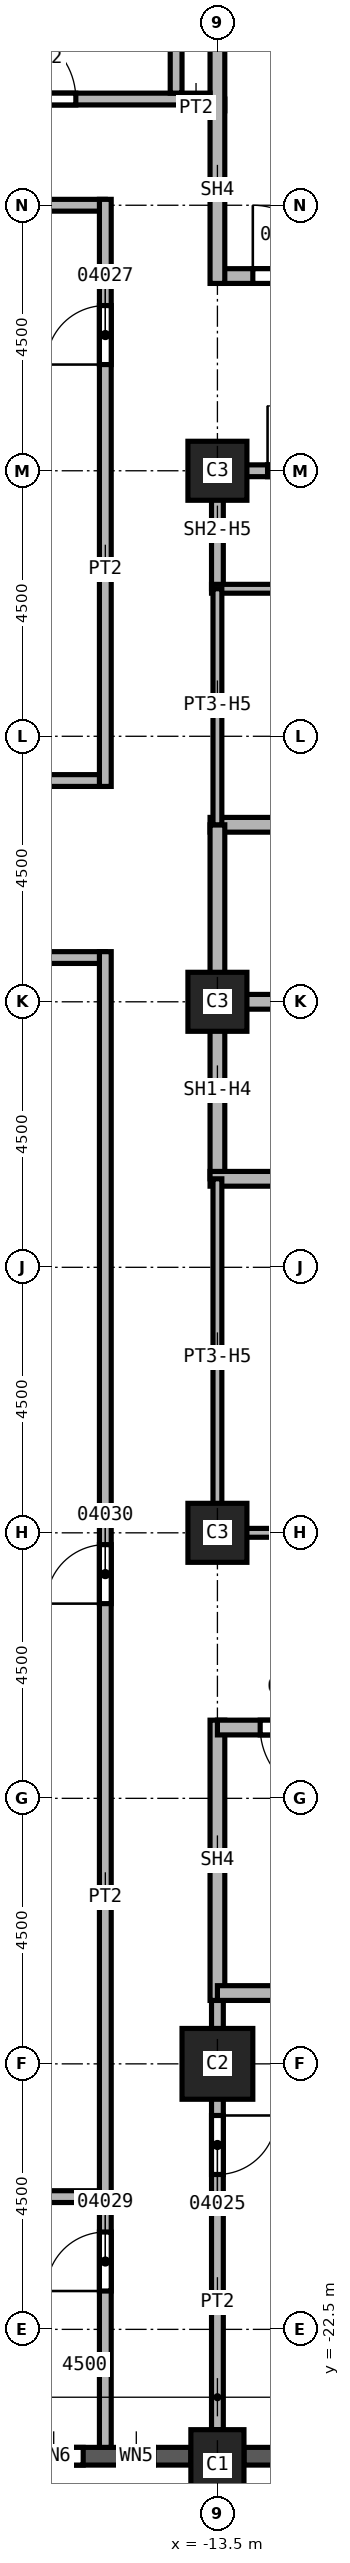
"""IFC4 building model, lengths in metres.
Left out: names, types, materials, properties, quantities, classifications, styles, units other than length and angle.
Written with IfcOpenShell. Run it as: python <this file> out.ifc"""

import sys

from ifc_helpers import new_model, si_unit, direction, frame, frame_2d, origin, origin_2d, place, context, subcontext, project, spatial, rectangle, extrude, element, fill, save


model = new_model("IFC4")
c1 = context("Model", 3, precision=1e-05, world=origin(), true_north=direction((0.0, 1.0)))
c2 = subcontext(c1, "Body", "Model", "MODEL_VIEW")
j1 = project(units=[si_unit("LENGTHUNIT", "METRE"), si_unit("PLANEANGLEUNIT", "RADIAN")], contexts=[c1])
p1 = place(None, origin())
s1 = spatial("IfcSite", under=j1, at=p1, CompositionType="ELEMENT")
p2 = place(p1, origin())
s2 = spatial("IfcBuilding", under=s1, at=p2, CompositionType="ELEMENT")
p3 = place(p2, frame((0.0, 0.0, 108.0)))
s3 = spatial("IfcBuildingStorey", under=s2, at=p3, CompositionType="ELEMENT", Elevation=108.0)
p4 = place(p3, frame((-13.5, -18.0, 0.0), z_axis=(0.0, 0.0, 1.0), x_axis=(1.0, 0.0, 0.0)))
e1 = element("IfcColumn", 1, at=p4, inside=s3, PredefinedType="COLUMN", context=c2, shape_type="SweptSolid", body=[
    extrude(rectangle(XDim=1.2, YDim=1.2, at=origin_2d()), origin(), (0.0, 0.0, 1.0), 3.7),
])
for number, where, z_axis, x_axis in (
    (2, (-13.5, 0.0, 0.0), (0.0, 0.0, 1.0), (1.0, 0.0, 0.0)),
    (3, (-13.5, 9.0, 0.0), (0.0, 0.0, 1.0), (1.0, 0.0, 0.0)),
    (4, (-13.5, -9.0, 0.0), (0.0, 0.0, 1.0), (1.0, 0.0, 0.0)),
):
    element("IfcColumn", number, at=place(p3, frame(where, z_axis=z_axis, x_axis=x_axis)), inside=s3, PredefinedType="COLUMN", context=c2, shape_type="SweptSolid", body=[
        extrude(rectangle(XDim=1.0, YDim=1.0, at=origin_2d()), origin(), (0.0, 0.0, 1.0), 3.7),
    ])
p5 = place(p3, frame((-13.5, -24.8, 0.0), z_axis=(0.0, 0.0, 1.0), x_axis=(1.0, 0.0, 0.0)))
e5 = element("IfcColumn", 5, at=p5, inside=s3, PredefinedType="COLUMN", context=c2, shape_type="SweptSolid", body=[
    extrude(rectangle(XDim=0.9, YDim=1.2, at=origin_2d()), origin(), (0.0, 0.0, 1.0), 3.7),
])
p6 = place(p3, frame((-17.55, -24.65, 0.0), z_axis=(0.0, 0.0, 1.0), x_axis=(1.0, 0.0, 0.0)))
e6 = element("IfcWall", 6, at=p6, inside=s3, PredefinedType="SOLIDWALL", context=c2, shape_type="SweptSolid", body=[
    extrude(rectangle(XDim=3.6, YDim=0.3, at=frame_2d((1.8, 0.0))), origin(), (0.0, 0.0, 1.0), 3.1),
])
p7 = place(p6, frame((0.775, 0.0, 0.8)))
e7 = element("IfcOpeningElement", 7, at=p7, cuts=e6, PredefinedType="OPENING", context=c2, shape_type="SweptSolid", body=[
    extrude(rectangle(XDim=1.0, YDim=1.95, at=frame_2d((0.5, 0.975))), frame((0.0, 0.15, 0.0), z_axis=(0.0, -1.0, 0.0), x_axis=(1.0, 0.0, 0.0)), (0.0, 0.0, 1.0), 0.3),
])
p8 = place(p6, frame((2.375, 0.0, 0.8)))
e8 = element("IfcOpeningElement", 8, at=p8, cuts=e6, PredefinedType="OPENING", context=c2, shape_type="SweptSolid", body=[
    extrude(rectangle(XDim=0.6, YDim=1.95, at=frame_2d((0.3, 0.975))), frame((0.0, 0.15, 0.0), z_axis=(0.0, -1.0, 0.0), x_axis=(1.0, 0.0, 0.0)), (0.0, 0.0, 1.0), 0.3),
])
p9 = place(p3, frame((-13.05, -24.65, 0.0), z_axis=(0.0, 0.0, 1.0), x_axis=(1.0, 0.0, 0.0)))
e9 = element("IfcWall", 9, at=p9, inside=s3, PredefinedType="SOLIDWALL", context=c2, shape_type="SweptSolid", body=[
    extrude(rectangle(XDim=3.6, YDim=0.3, at=frame_2d((1.8, 0.0))), origin(), (0.0, 0.0, 1.0), 3.1),
])
p10 = place(p9, frame((0.6, 0.0, 0.8)))
e10 = element("IfcOpeningElement", 10, at=p10, cuts=e9, PredefinedType="OPENING", context=c2, shape_type="SweptSolid", body=[
    extrude(rectangle(XDim=2.4, YDim=1.95, at=frame_2d((1.2, 0.975))), frame((0.0, 0.15, 0.0), z_axis=(0.0, -1.0, 0.0), x_axis=(1.0, 0.0, 0.0)), (0.0, 0.0, 1.0), 0.3),
])
p11 = place(p3, frame((-33.85, 3.75, 0.0), z_axis=(0.0, 0.0, 1.0), x_axis=(1.0, 0.0, 0.0)))
e11 = element("IfcWall", 11, at=p11, inside=s3, PredefinedType="PARTITIONING", context=c2, shape_type="SweptSolid", body=[
    extrude(rectangle(XDim=18.45, YDim=0.2, at=frame_2d((9.225, 0.0))), origin(), (0.0, 0.0, 1.0), 3.7),
])
p12 = place(p3, frame((-15.4, 0.75, 0.0), z_axis=(0.0, 0.0, 1.0), x_axis=(-1.0, 0.0, 0.0)))
e12 = element("IfcWall", 12, at=p12, inside=s3, PredefinedType="PARTITIONING", context=c2, shape_type="SweptSolid", body=[
    extrude(rectangle(XDim=18.45, YDim=0.2, at=frame_2d((9.225, 0.0))), origin(), (0.0, 0.0, 1.0), 3.7),
])
p13 = place(p12, frame((12.65, 0.0, 0.0)))
e13 = element("IfcOpeningElement", 13, at=p13, cuts=e12, PredefinedType="OPENING", context=c2, shape_type="SweptSolid", body=[
    extrude(rectangle(XDim=1.0, YDim=2.1, at=frame_2d((0.5, 1.05))), frame((0.0, 0.1, 0.0), z_axis=(0.0, -1.0, 0.0), x_axis=(1.0, 0.0, 0.0)), (0.0, 0.0, 1.0), 0.2),
])
p14 = place(p3, frame((-24.3, -20.25, 0.0), z_axis=(0.0, 0.0, 1.0), x_axis=(1.0, 0.0, 0.0)))
e14 = element("IfcWall", 14, at=p14, inside=s3, PredefinedType="PARTITIONING", context=c2, shape_type="SweptSolid", body=[
    extrude(rectangle(XDim=8.9, YDim=0.2, at=frame_2d((4.45, 0.0))), origin(), (0.0, 0.0, 1.0), 3.7),
])
p15 = place(p3, frame((-15.4, 13.5, 0.0), z_axis=(0.0, 0.0, 1.0), x_axis=(-1.0, 0.0, 0.0)))
e15 = element("IfcWall", 15, at=p15, inside=s3, PredefinedType="PARTITIONING", context=c2, shape_type="SweptSolid", body=[
    extrude(rectangle(XDim=6.6, YDim=0.2, at=frame_2d((3.3, 0.0))), origin(), (0.0, 0.0, 1.0), 3.7),
])
p16 = place(p3, frame((-15.4, -24.5, 0.0), z_axis=(0.0, 0.0, 1.0), x_axis=(0.0, 1.0, 0.0)))
e16 = element("IfcWall", 16, at=p16, inside=s3, PredefinedType="PARTITIONING", context=c2, shape_type="SweptSolid", body=[
    extrude(rectangle(XDim=25.35, YDim=0.2, at=frame_2d((12.675, 0.0))), origin(), (0.0, 0.0, 1.0), 3.7),
])
p17 = place(p16, frame((2.65, 0.0, 0.0)))
e17 = element("IfcOpeningElement", 17, at=p17, cuts=e16, PredefinedType="OPENING", context=c2, shape_type="SweptSolid", body=[
    extrude(rectangle(XDim=1.0, YDim=2.1, at=frame_2d((0.5, 1.05))), frame((0.0, 0.1, 0.0), z_axis=(0.0, -1.0, 0.0), x_axis=(1.0, 0.0, 0.0)), (0.0, 0.0, 1.0), 0.2),
])
p18 = place(p16, frame((14.3, 0.0, 0.0)))
e18 = element("IfcOpeningElement", 18, at=p18, cuts=e16, PredefinedType="OPENING", context=c2, shape_type="SweptSolid", body=[
    extrude(rectangle(XDim=1.0, YDim=2.1, at=frame_2d((0.5, 1.05))), frame((0.0, 0.1, 0.0), z_axis=(0.0, -1.0, 0.0), x_axis=(1.0, 0.0, 0.0)), (0.0, 0.0, 1.0), 0.2),
])
p19 = place(p3, frame((-15.4, 3.65, 0.0), z_axis=(0.0, 0.0, 1.0), x_axis=(0.0, 1.0, 0.0)))
e19 = element("IfcWall", 19, at=p19, inside=s3, PredefinedType="PARTITIONING", context=c2, shape_type="SweptSolid", body=[
    extrude(rectangle(XDim=9.95, YDim=0.2, at=frame_2d((4.975, 0.0))), origin(), (0.0, 0.0, 1.0), 3.7),
])
p20 = place(p19, frame((7.15, 0.0, 0.0)))
e20 = element("IfcOpeningElement", 20, at=p20, cuts=e19, PredefinedType="OPENING", context=c2, shape_type="SweptSolid", body=[
    extrude(rectangle(XDim=1.0, YDim=2.1, at=frame_2d((0.5, 1.05))), frame((0.0, 0.1, 0.0), z_axis=(0.0, -1.0, 0.0), x_axis=(1.0, 0.0, 0.0)), (0.0, 0.0, 1.0), 0.2),
])
p21 = place(p3, frame((-14.1, 15.2, 0.0), z_axis=(0.0, 0.0, 1.0), x_axis=(1.0, 0.0, 0.0)))
e21 = element("IfcWall", 21, at=p21, inside=s3, PredefinedType="PARTITIONING", context=c2, shape_type="SweptSolid", body=[
    extrude(rectangle(XDim=0.725, YDim=0.2, at=frame_2d((0.363, 0.0))), origin(), (0.0, 0.0, 1.0), 3.7),
])
p22 = place(p3, frame((-13.5, -16.675, 0.0), z_axis=(0.0, 0.0, 1.0), x_axis=(0.0, -1.0, 0.0)))
e22 = element("IfcWall", 22, at=p22, inside=s3, PredefinedType="PARTITIONING", context=c2, shape_type="SweptSolid", body=[
    extrude(rectangle(XDim=7.525, YDim=0.2, at=frame_2d((3.762, 0.0))), origin(), (0.0, 0.0, 1.0), 3.7),
])
p23 = place(p22, frame((2.2, 0.0, 0.0)))
e23 = element("IfcOpeningElement", 23, at=p23, cuts=e22, PredefinedType="OPENING", context=c2, shape_type="SweptSolid", body=[
    extrude(rectangle(XDim=1.0, YDim=2.1, at=frame_2d((0.5, 1.05))), frame((0.0, 0.1, 0.0), z_axis=(0.0, -1.0, 0.0), x_axis=(1.0, 0.0, 0.0)), (0.0, 0.0, 1.0), 0.2),
])
p24 = place(p3, frame((-13.5, 7.0, 0.0), z_axis=(0.0, 0.0, 1.0), x_axis=(0.0, 1.0, 0.0)))
e24 = element("IfcWall", 24, at=p24, inside=s3, PredefinedType="SOLIDWALL", context=c2, shape_type="SweptSolid", body=[
    extrude(rectangle(XDim=2.1, YDim=0.2, at=frame_2d((1.05, 0.0))), origin(), (0.0, 0.0, 1.0), 2.938),
])
p25 = place(p3, frame((-13.5, 9.0, 0.0), z_axis=(0.0, 0.0, 1.0), x_axis=(1.0, 0.0, 0.0)))
e25 = element("IfcWall", 25, at=p25, inside=s3, PredefinedType="SOLIDWALL", context=c2, shape_type="SweptSolid", body=[
    extrude(rectangle(XDim=3.0, YDim=0.2, at=frame_2d((1.5, 0.0))), origin(), (0.0, 0.0, 1.0), 2.938),
])
p26 = place(p25, frame((0.85, 0.0, 0.0)))
e26 = element("IfcOpeningElement", 26, at=p26, cuts=e25, PredefinedType="OPENING", context=c2, shape_type="SweptSolid", body=[
    extrude(rectangle(XDim=1.1, YDim=2.1, at=frame_2d((0.55, 1.05))), frame((0.0, 0.1, 0.0), z_axis=(0.0, -1.0, 0.0), x_axis=(1.0, 0.0, 0.0)), (0.0, 0.0, 1.0), 0.2),
])
p27 = place(p3, frame((-13.625, 0.0, 0.0), z_axis=(0.0, 0.0, 1.0), x_axis=(1.0, 0.0, 0.0)))
e27 = element("IfcWall", 27, at=p27, inside=s3, PredefinedType="SOLIDWALL", context=c2, shape_type="SweptSolid", body=[
    extrude(rectangle(XDim=3.125, YDim=0.25, at=frame_2d((1.562, 0.0))), origin(), (0.0, 0.0, 1.0), 3.7),
])
p28 = place(p3, frame((-13.625, 3.0, 0.0), z_axis=(0.0, 0.0, 1.0), x_axis=(1.0, 0.0, 0.0)))
e28 = element("IfcWall", 28, at=p28, inside=s3, PredefinedType="SOLIDWALL", context=c2, shape_type="SweptSolid", body=[
    extrude(rectangle(XDim=6.125, YDim=0.25, at=frame_2d((3.062, 0.0))), origin(), (0.0, 0.0, 1.0), 3.7),
])
p29 = place(p28, frame((3.25, 0.0, 0.0)))
e29 = element("IfcOpeningElement", 29, at=p29, cuts=e28, PredefinedType="OPENING", context=c2, shape_type="SweptSolid", body=[
    extrude(rectangle(XDim=1.1, YDim=2.1, at=frame_2d((0.55, 1.05))), frame((0.0, 0.125, 0.0), z_axis=(0.0, -1.0, 0.0), x_axis=(1.0, 0.0, 0.0)), (0.0, 0.0, 1.0), 0.25),
])
p30 = place(p3, frame((-13.5, -3.0, 0.0), z_axis=(0.0, 0.0, 1.0), x_axis=(0.0, 1.0, 0.0)))
e30 = element("IfcWall", 30, at=p30, inside=s3, PredefinedType="SOLIDWALL", context=c2, shape_type="SweptSolid", body=[
    extrude(rectangle(XDim=6.0, YDim=0.25, at=frame_2d((3.0, 0.0))), origin(), (0.0, 0.0, 1.0), 2.938),
])
p31 = place(p3, frame((-13.625, -3.0, 0.0), z_axis=(0.0, 0.0, 1.0), x_axis=(1.0, 0.0, 0.0)))
e31 = element("IfcWall", 31, at=p31, inside=s3, PredefinedType="SOLIDWALL", context=c2, shape_type="SweptSolid", body=[
    extrude(rectangle(XDim=9.25, YDim=0.25, at=frame_2d((4.625, 0.0))), origin(), (0.0, 0.0, 1.0), 3.7),
])
p32 = place(p31, frame((3.25, 0.0, 0.0)))
e32 = element("IfcOpeningElement", 32, at=p32, cuts=e31, PredefinedType="OPENING", context=c2, shape_type="SweptSolid", body=[
    extrude(rectangle(XDim=1.1, YDim=2.1, at=frame_2d((0.55, 1.05))), frame((0.0, 0.125, 0.0), z_axis=(0.0, -1.0, 0.0), x_axis=(1.0, 0.0, 0.0)), (0.0, 0.0, 1.0), 0.25),
])
p33 = place(p3, frame((-13.5, -12.175, 0.0), z_axis=(0.0, 0.0, 1.0), x_axis=(0.0, -1.0, 0.0)))
e33 = element("IfcWall", 33, at=p33, inside=s3, PredefinedType="SOLIDWALL", context=c2, shape_type="SweptSolid", body=[
    extrude(rectangle(XDim=4.75, YDim=0.25, at=frame_2d((2.375, 0.0))), origin(), (0.0, 0.0, 1.0), 3.7),
])
p34 = place(p3, frame((-13.5, 12.3, 0.0), z_axis=(0.0, 0.0, 1.0), x_axis=(1.0, 0.0, 0.0)))
e34 = element("IfcWall", 34, at=p34, inside=s3, PredefinedType="SOLIDWALL", context=c2, shape_type="SweptSolid", body=[
    extrude(rectangle(XDim=9.125, YDim=0.25, at=frame_2d((4.562, 0.0))), origin(), (0.0, 0.0, 1.0), 3.7),
])
p35 = place(p34, frame((0.6, 0.0, 0.0)))
e35 = element("IfcOpeningElement", 35, at=p35, cuts=e34, PredefinedType="OPENING", context=c2, shape_type="SweptSolid", body=[
    extrude(rectangle(XDim=1.2, YDim=2.1, at=frame_2d((0.6, 1.05))), frame((0.0, 0.125, 0.0), z_axis=(0.0, -1.0, 0.0), x_axis=(1.0, 0.0, 0.0)), (0.0, 0.0, 1.0), 0.25),
])
p36 = place(p3, frame((-13.5, 12.175, 0.0), z_axis=(0.0, 0.0, 1.0), x_axis=(0.0, 1.0, 0.0)))
e36 = element("IfcWall", 36, at=p36, inside=s3, PredefinedType="SOLIDWALL", context=c2, shape_type="SweptSolid", body=[
    extrude(rectangle(XDim=4.75, YDim=0.25, at=frame_2d((2.375, 0.0))), origin(), (0.0, 0.0, 1.0), 3.7),
])
p37 = place(p3, frame((-4.5, -16.8, 0.0), z_axis=(0.0, 0.0, 1.0), x_axis=(-1.0, 0.0, 0.0)))
e37 = element("IfcWall", 37, at=p37, inside=s3, PredefinedType="SOLIDWALL", context=c2, shape_type="SweptSolid", body=[
    extrude(rectangle(XDim=9.0, YDim=0.25, at=frame_2d((4.5, 0.0))), origin(), (0.0, 0.0, 1.0), 3.7),
])
p38 = place(p3, frame((-4.375, -12.3, 0.0), z_axis=(0.0, 0.0, 1.0), x_axis=(-1.0, 0.0, 0.0)))
e38 = element("IfcWall", 38, at=p38, inside=s3, PredefinedType="SOLIDWALL", context=c2, shape_type="SweptSolid", body=[
    extrude(rectangle(XDim=9.125, YDim=0.25, at=frame_2d((4.562, 0.0))), origin(), (0.0, 0.0, 1.0), 3.7),
])
p39 = place(p38, frame((7.2, 0.0, 0.0)))
e39 = element("IfcOpeningElement", 39, at=p39, cuts=e38, PredefinedType="OPENING", context=c2, shape_type="SweptSolid", body=[
    extrude(rectangle(XDim=1.2, YDim=2.1, at=frame_2d((0.6, 1.05))), frame((0.0, 0.125, 0.0), z_axis=(0.0, -1.0, 0.0), x_axis=(1.0, 0.0, 0.0)), (0.0, 0.0, 1.0), 0.25),
])
p40 = place(p3, frame((-13.6, 7.0, 0.0), z_axis=(0.0, 0.0, 1.0), x_axis=(1.0, 0.0, 0.0)))
e40 = element("IfcWall", 40, at=p40, inside=s3, PredefinedType="PARTITIONING", context=c2, shape_type="SweptSolid", body=[
    extrude(rectangle(XDim=3.1, YDim=0.15, at=frame_2d((1.55, 0.0))), origin(), (0.0, 0.0, 1.0), 3.7),
])
p41 = place(p3, frame((-13.5, -9.075, 0.0), z_axis=(0.0, 0.0, 1.0), x_axis=(0.0, 1.0, 0.0)))
e41 = element("IfcWall", 41, at=p41, inside=s3, PredefinedType="PARTITIONING", context=c2, shape_type="SweptSolid", body=[
    extrude(rectangle(XDim=6.075, YDim=0.15, at=frame_2d((3.038, 0.0))), origin(), (0.0, 0.0, 1.0), 2.938),
])
p42 = place(p3, frame((-13.5, 3.0, 0.0), z_axis=(0.0, 0.0, 1.0), x_axis=(0.0, 1.0, 0.0)))
e42 = element("IfcWall", 42, at=p42, inside=s3, PredefinedType="PARTITIONING", context=c2, shape_type="SweptSolid", body=[
    extrude(rectangle(XDim=4.0, YDim=0.15, at=frame_2d((2.0, 0.0))), origin(), (0.0, 0.0, 1.0), 2.938),
])
p43 = place(p3, frame((-10.5, -9.0, 0.0), z_axis=(0.0, 0.0, 1.0), x_axis=(-1.0, 0.0, 0.0)))
e43 = element("IfcWall", 43, at=p43, inside=s3, PredefinedType="PARTITIONING", context=c2, shape_type="SweptSolid", body=[
    extrude(rectangle(XDim=3.0, YDim=0.15, at=frame_2d((1.5, 0.0))), origin(), (0.0, 0.0, 1.0), 2.938),
])
p44 = place(p3, frame((-21.9, 15.3, 0.0), z_axis=(0.0, 0.0, 1.0), x_axis=(1.0, 0.0, 0.0)))
e44 = element("IfcWall", 44, at=p44, inside=s3, PredefinedType="SOLIDWALL", context=c2, shape_type="SweptSolid", body=[
    extrude(rectangle(XDim=8.275, YDim=0.2, at=frame_2d((4.137, 0.0))), origin(), (0.0, 0.0, 1.0), 3.7),
])
p45 = place(p44, frame((4.8, 0.0, 0.0)))
e45 = element("IfcOpeningElement", 45, at=p45, cuts=e44, PredefinedType="OPENING", context=c2, shape_type="SweptSolid", body=[
    extrude(rectangle(XDim=1.2, YDim=2.1, at=frame_2d((0.6, 1.05))), frame((0.0, 0.1, 0.0), z_axis=(0.0, -1.0, 0.0), x_axis=(1.0, 0.0, 0.0)), (0.0, 0.0, 1.0), 0.2),
])
p46 = place(p3, frame((-14.2, 15.4, 0.0), z_axis=(0.0, 0.0, 1.0), x_axis=(0.0, 1.0, 0.0)))
e46 = element("IfcWall", 46, at=p46, inside=s3, PredefinedType="SOLIDWALL", context=c2, shape_type="SweptSolid", body=[
    extrude(rectangle(XDim=5.9, YDim=0.2, at=frame_2d((2.95, 0.0))), origin(), (0.0, 0.0, 1.0), 3.7),
])
p47 = place(p26, origin())
e47 = element("IfcDoor", 47, at=p47, inside=s3, OperationType="SINGLE_SWING_RIGHT", PredefinedType="DOOR", context=c2, shape_type="SweptSolid", body=[
    extrude(rectangle(XDim=1.1, YDim=2.1, at=frame_2d((0.55, 1.05))), frame((0.0, 0.025, 0.0), z_axis=(0.0, -1.0, 0.0), x_axis=(1.0, 0.0, 0.0)), (0.0, 0.0, 1.0), 0.05),
])
fill(e26, e47)
p48 = place(p35, origin())
e48 = element("IfcDoor", 48, at=p48, inside=s3, OperationType="SINGLE_SWING_RIGHT", PredefinedType="DOOR", context=c2, shape_type="SweptSolid", body=[
    extrude(rectangle(XDim=1.2, YDim=2.1, at=frame_2d((0.6, 1.05))), frame((0.0, 0.025, 0.0), z_axis=(0.0, -1.0, 0.0), x_axis=(1.0, 0.0, 0.0)), (0.0, 0.0, 1.0), 0.05),
])
fill(e35, e48)
p49 = place(p39, origin())
e49 = element("IfcDoor", 49, at=p49, inside=s3, OperationType="SINGLE_SWING_LEFT", PredefinedType="DOOR", context=c2, shape_type="SweptSolid", body=[
    extrude(rectangle(XDim=1.2, YDim=2.1, at=frame_2d((0.6, 1.05))), frame((0.0, 0.025, 0.0), z_axis=(0.0, -1.0, 0.0), x_axis=(1.0, 0.0, 0.0)), (0.0, 0.0, 1.0), 0.05),
])
fill(e39, e49)
p50 = place(p23, origin())
e50 = element("IfcDoor", 50, at=p50, inside=s3, OperationType="SINGLE_SWING_RIGHT", PredefinedType="DOOR", context=c2, shape_type="SweptSolid", body=[
    extrude(rectangle(XDim=1.0, YDim=2.1, at=frame_2d((0.5, 1.05))), frame((0.0, 0.025, 0.0), z_axis=(0.0, -1.0, 0.0), x_axis=(1.0, 0.0, 0.0)), (0.0, 0.0, 1.0), 0.05),
])
fill(e23, e50)
p51 = place(p20, origin())
e51 = element("IfcDoor", 51, at=p51, inside=s3, OperationType="SINGLE_SWING_RIGHT", PredefinedType="DOOR", context=c2, shape_type="SweptSolid", body=[
    extrude(rectangle(XDim=1.0, YDim=2.1, at=frame_2d((0.5, 1.05))), frame((0.0, 0.025, 0.0), z_axis=(0.0, -1.0, 0.0), x_axis=(1.0, 0.0, 0.0)), (0.0, 0.0, 1.0), 0.05),
])
fill(e20, e51)
p52 = place(p17, origin())
e52 = element("IfcDoor", 52, at=p52, inside=s3, OperationType="SINGLE_SWING_RIGHT", PredefinedType="DOOR", context=c2, shape_type="SweptSolid", body=[
    extrude(rectangle(XDim=1.0, YDim=2.1, at=frame_2d((0.5, 1.05))), frame((0.0, 0.025, 0.0), z_axis=(0.0, -1.0, 0.0), x_axis=(1.0, 0.0, 0.0)), (0.0, 0.0, 1.0), 0.05),
])
fill(e17, e52)
p53 = place(p18, origin())
e53 = element("IfcDoor", 53, at=p53, inside=s3, OperationType="SINGLE_SWING_LEFT", PredefinedType="DOOR", context=c2, shape_type="SweptSolid", body=[
    extrude(rectangle(XDim=1.0, YDim=2.1, at=frame_2d((0.5, 1.05))), frame((0.0, 0.025, 0.0), z_axis=(0.0, -1.0, 0.0), x_axis=(1.0, 0.0, 0.0)), (0.0, 0.0, 1.0), 0.05),
])
fill(e18, e53)
p54 = place(p45, origin())
e54 = element("IfcDoor", 54, at=p54, inside=s3, OperationType="SINGLE_SWING_RIGHT", PredefinedType="DOOR", context=c2, shape_type="SweptSolid", body=[
    extrude(rectangle(XDim=1.2, YDim=2.1, at=frame_2d((0.6, 1.05))), frame((0.0, 0.025, 0.0), z_axis=(0.0, -1.0, 0.0), x_axis=(1.0, 0.0, 0.0)), (0.0, 0.0, 1.0), 0.05),
])
fill(e45, e54)
p55 = place(p7, origin())
e55 = element("IfcWindow", 55, at=p55, inside=s3, PartitioningType="SINGLE_PANEL", PredefinedType="WINDOW", context=c2, shape_type="SweptSolid", body=[
    extrude(rectangle(XDim=1.0, YDim=1.95, at=frame_2d((0.5, 0.975))), frame((0.0, 0.03, 0.0), z_axis=(0.0, -1.0, 0.0), x_axis=(1.0, 0.0, 0.0)), (0.0, 0.0, 1.0), 0.06),
])
fill(e7, e55)
p56 = place(p8, origin())
e56 = element("IfcWindow", 56, at=p56, inside=s3, PartitioningType="SINGLE_PANEL", PredefinedType="WINDOW", context=c2, shape_type="SweptSolid", body=[
    extrude(rectangle(XDim=0.6, YDim=1.95, at=frame_2d((0.3, 0.975))), frame((0.0, 0.03, 0.0), z_axis=(0.0, -1.0, 0.0), x_axis=(1.0, 0.0, 0.0)), (0.0, 0.0, 1.0), 0.06),
])
fill(e8, e56)
save(model, sys.argv[1])
